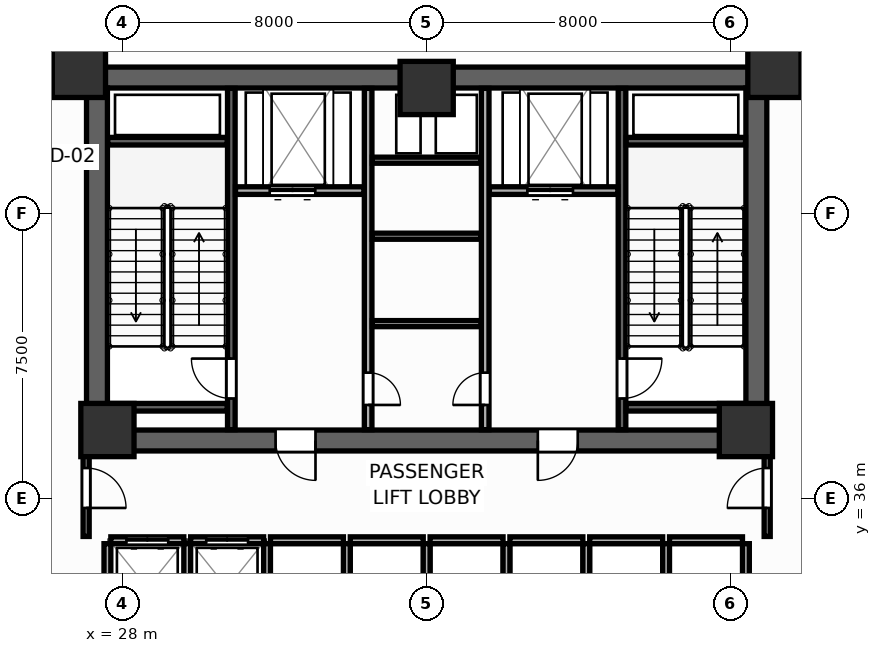
"""IFC4 building model, lengths in metres.
Left out: names, types, materials, properties, quantities, classifications, styles, units other than length and angle.
Written with IfcOpenShell. Run it as: python <this file> out.ifc"""

import sys

from ifc_helpers import new_model, si_unit, direction, frame, frame_2d, origin, origin_2d, place, context, subcontext, project, spatial, rectangle, extrude, source, transform, mapped, element, fill, save


model = new_model("IFC4")
c1 = context("Model", 3, precision=1e-05, world=origin(), true_north=direction((0.0, 1.0)))
c2 = subcontext(c1, "Body", "Model", "MODEL_VIEW")
j1 = project(units=[si_unit("LENGTHUNIT", "METRE"), si_unit("PLANEANGLEUNIT", "RADIAN")], contexts=[c1])
p1 = place(None, origin())
s1 = spatial("IfcSite", under=j1, at=p1, CompositionType="ELEMENT")
p2 = place(p1, origin())
s2 = spatial("IfcBuilding", under=s1, at=p2, CompositionType="ELEMENT")
p3 = place(p2, frame((0.0, 0.0, 19.2)))
s3 = spatial("IfcBuildingStorey", under=s2, at=p3, CompositionType="ELEMENT", Elevation=19.2)
p4 = place(p3, frame((27.05, 47.075, 0.0), z_axis=(0.0, 0.0, 1.0), x_axis=(1.0, 0.0, 0.0)))
e1 = element("IfcWall", 1, at=p4, inside=s3, PredefinedType="SHEAR", context=c2, shape_type="SweptSolid", body=[
    extrude(rectangle(XDim=17.9, YDim=0.55, at=frame_2d((8.95, 0.0))), origin(), (0.0, 0.0, 1.0), 4.8),
])
p5 = place(p3, frame((27.05, 37.525, 0.0), z_axis=(0.0, 0.0, 1.0), x_axis=(1.0, 0.0, 0.0)))
e2 = element("IfcWall", 2, at=p5, inside=s3, PredefinedType="SHEAR", context=c2, shape_type="SweptSolid", body=[
    extrude(rectangle(XDim=17.9, YDim=0.55, at=frame_2d((8.95, 0.0))), origin(), (0.0, 0.0, 1.0), 4.8),
])
p6 = place(p5, frame((4.975, 0.0, 0.0)))
e3 = element("IfcOpeningElement", 3, at=p6, cuts=e2, PredefinedType="OPENING", context=c2, shape_type="SweptSolid", body=[
    extrude(rectangle(XDim=1.05, YDim=2.1, at=frame_2d((0.525, 1.05))), frame((0.0, 0.285, 0.0), z_axis=(0.0, -1.0, 0.0), x_axis=(1.0, 0.0, 0.0)), (0.0, 0.0, 1.0), 0.57),
])
p7 = place(p5, frame((11.875, 0.0, 0.0)))
e4 = element("IfcOpeningElement", 4, at=p7, cuts=e2, PredefinedType="OPENING", context=c2, shape_type="SweptSolid", body=[
    extrude(rectangle(XDim=1.05, YDim=2.1, at=frame_2d((0.525, 1.05))), frame((0.0, 0.285, 0.0), z_axis=(0.0, -1.0, 0.0), x_axis=(1.0, 0.0, 0.0)), (0.0, 0.0, 1.0), 0.57),
])
for number, where, z_axis, x_axis in (
    (5, (27.325, 37.8, 0.0), (0.0, 0.0, 1.0), (0.0, 1.0, 0.0)),
    (6, (44.675, 37.8, 0.0), (0.0, 0.0, 1.0), (0.0, 1.0, 0.0)),
):
    element("IfcWall", number, at=place(p3, frame(where, z_axis=z_axis, x_axis=x_axis)), inside=s3, PredefinedType="SHEAR", context=c2, shape_type="SweptSolid", body=[
        extrude(rectangle(XDim=9.0, YDim=0.55, at=frame_2d((4.5, 0.0))), origin(), (0.0, 0.0, 1.0), 4.8),
    ])
m1 = source(origin(), c2, "Body", "SweptSolid", [
    extrude(rectangle(XDim=1.4, YDim=1.4, at=origin_2d()), origin(), (0.0, 0.0, 1.0), 4.8),
])
for number, where, z_axis, x_axis in (
    (7, (26.85, 47.25, 0.0), (0.0, 0.0, 1.0), (1.0, 0.0, 0.0)),
    (8, (45.15, 47.25, 0.0), (0.0, 0.0, 1.0), (1.0, 0.0, 0.0)),
    (9, (27.6, 37.8, 0.0), (0.0, 0.0, 1.0), (1.0, 0.0, 0.0)),
    (10, (44.4, 37.8, 0.0), (0.0, 0.0, 1.0), (1.0, 0.0, 0.0)),
    (11, (36.0, 46.8, 0.0), (0.0, 0.0, 1.0), (1.0, 0.0, 0.0)),
):
    element("IfcColumn", number, at=place(p3, frame(where, z_axis=z_axis, x_axis=x_axis)), inside=s3, PredefinedType="COLUMN", context=c2, shape_type="MappedRepresentation", body=[
        mapped(m1, transform((0.0, 0.0, 0.0), scale=1.0)),
    ])
p8 = place(p3, frame((30.86, 37.81, 0.0), z_axis=(0.0, 0.0, 1.0), x_axis=(0.0, 1.0, 0.0)))
e12 = element("IfcWall", 12, at=p8, inside=s3, PredefinedType="SHEAR", context=c2, shape_type="SweptSolid", body=[
    extrude(rectangle(XDim=8.98, YDim=0.2, at=frame_2d((4.49, 0.0))), origin(), (0.0, 0.0, 1.0), 4.8),
])
p9 = place(p8, frame((0.82, 0.0, 0.0)))
e13 = element("IfcOpeningElement", 13, at=p9, cuts=e12, PredefinedType="OPENING", context=c2, shape_type="SweptSolid", body=[
    extrude(rectangle(XDim=1.05, YDim=2.1, at=frame_2d((0.525, 1.05))), frame((0.0, 0.11, 0.0), z_axis=(0.0, -1.0, 0.0), x_axis=(1.0, 0.0, 0.0)), (0.0, 0.0, 1.0), 0.22),
])
for number, where, z_axis, x_axis in (
    (14, (27.61, 45.4, 0.0), (0.0, 0.0, 1.0), (1.0, 0.0, 0.0)),
    (15, (27.61, 38.4, 0.0), (0.0, 0.0, 1.0), (1.0, 0.0, 0.0)),
):
    element("IfcWall", number, at=place(p3, frame(where, z_axis=z_axis, x_axis=x_axis)), inside=s3, PredefinedType="SHEAR", context=c2, shape_type="SweptSolid", body=[
        extrude(rectangle(XDim=3.14, YDim=0.2, at=frame_2d((1.57, 0.0))), origin(), (0.0, 0.0, 1.0), 4.8),
    ])
p10 = place(p3, frame((41.14, 37.81, 0.0), z_axis=(0.0, 0.0, 1.0), x_axis=(0.0, 1.0, 0.0)))
e16 = element("IfcWall", 16, at=p10, inside=s3, PredefinedType="SHEAR", context=c2, shape_type="SweptSolid", body=[
    extrude(rectangle(XDim=8.98, YDim=0.2, at=frame_2d((4.49, 0.0))), origin(), (0.0, 0.0, 1.0), 4.8),
])
p11 = place(p10, frame((0.82, 0.0, 0.0)))
e17 = element("IfcOpeningElement", 17, at=p11, cuts=e16, PredefinedType="OPENING", context=c2, shape_type="SweptSolid", body=[
    extrude(rectangle(XDim=1.05, YDim=2.1, at=frame_2d((0.525, 1.05))), frame((0.0, 0.11, 0.0), z_axis=(0.0, -1.0, 0.0), x_axis=(1.0, 0.0, 0.0)), (0.0, 0.0, 1.0), 0.22),
])
for number, where, z_axis, x_axis in (
    (18, (41.25, 45.4, 0.0), (0.0, 0.0, 1.0), (1.0, 0.0, 0.0)),
    (19, (41.25, 38.4, 0.0), (0.0, 0.0, 1.0), (1.0, 0.0, 0.0)),
):
    element("IfcWall", number, at=place(p3, frame(where, z_axis=z_axis, x_axis=x_axis)), inside=s3, PredefinedType="SHEAR", context=c2, shape_type="SweptSolid", body=[
        extrude(rectangle(XDim=3.14, YDim=0.2, at=frame_2d((1.57, 0.0))), origin(), (0.0, 0.0, 1.0), 4.8),
    ])
p12 = place(p3, frame((30.97, 44.1, 0.0), z_axis=(0.0, 0.0, 1.0), x_axis=(1.0, 0.0, 0.0)))
e20 = element("IfcWall", 20, at=p12, inside=s3, PredefinedType="PARTITIONING", context=c2, shape_type="SweptSolid", body=[
    extrude(rectangle(XDim=3.38, YDim=0.2, at=frame_2d((1.69, 0.0))), origin(), (0.0, 0.0, 1.0), 4.58),
])
p13 = place(p12, frame((0.9, 0.0, 0.0)))
e21 = element("IfcOpeningElement", 21, at=p13, cuts=e20, PredefinedType="OPENING", context=c2, shape_type="SweptSolid", body=[
    extrude(rectangle(XDim=1.2, YDim=2.1, at=frame_2d((0.6, 1.05))), frame((0.0, 0.11, 0.0), z_axis=(0.0, -1.0, 0.0), x_axis=(1.0, 0.0, 0.0)), (0.0, 0.0, 1.0), 0.22),
])
p14 = place(p3, frame((37.65, 44.1, 0.0), z_axis=(0.0, 0.0, 1.0), x_axis=(1.0, 0.0, 0.0)))
e22 = element("IfcWall", 22, at=p14, inside=s3, PredefinedType="PARTITIONING", context=c2, shape_type="SweptSolid", body=[
    extrude(rectangle(XDim=3.38, YDim=0.2, at=frame_2d((1.69, 0.0))), origin(), (0.0, 0.0, 1.0), 4.58),
])
p15 = place(p14, frame((1.0, 0.0, 0.0)))
e23 = element("IfcOpeningElement", 23, at=p15, cuts=e22, PredefinedType="OPENING", context=c2, shape_type="SweptSolid", body=[
    extrude(rectangle(XDim=1.2, YDim=2.1, at=frame_2d((0.6, 1.05))), frame((0.0, 0.11, 0.0), z_axis=(0.0, -1.0, 0.0), x_axis=(1.0, 0.0, 0.0)), (0.0, 0.0, 1.0), 0.22),
])
p16 = place(p3, frame((34.46, 37.81, 0.0), z_axis=(0.0, 0.0, 1.0), x_axis=(0.0, 1.0, 0.0)))
e24 = element("IfcWall", 24, at=p16, inside=s3, PredefinedType="PARTITIONING", context=c2, shape_type="SweptSolid", body=[
    extrude(rectangle(XDim=8.98, YDim=0.2, at=frame_2d((4.49, 0.0))), origin(), (0.0, 0.0, 1.0), 4.58),
])
p17 = place(p16, frame((0.65, 0.0, 0.0)))
e25 = element("IfcOpeningElement", 25, at=p17, cuts=e24, PredefinedType="OPENING", context=c2, shape_type="SweptSolid", body=[
    extrude(rectangle(XDim=0.85, YDim=2.05, at=frame_2d((0.425, 1.025))), frame((0.0, 0.11, 0.0), z_axis=(0.0, -1.0, 0.0), x_axis=(1.0, 0.0, 0.0)), (0.0, 0.0, 1.0), 0.22),
])
p18 = place(p3, frame((37.54, 37.81, 0.0), z_axis=(0.0, 0.0, 1.0), x_axis=(0.0, 1.0, 0.0)))
e26 = element("IfcWall", 26, at=p18, inside=s3, PredefinedType="PARTITIONING", context=c2, shape_type="SweptSolid", body=[
    extrude(rectangle(XDim=8.98, YDim=0.2, at=frame_2d((4.49, 0.0))), origin(), (0.0, 0.0, 1.0), 4.58),
])
p19 = place(p18, frame((0.65, 0.0, 0.0)))
e27 = element("IfcOpeningElement", 27, at=p19, cuts=e26, PredefinedType="OPENING", context=c2, shape_type="SweptSolid", body=[
    extrude(rectangle(XDim=0.85, YDim=2.05, at=frame_2d((0.425, 1.025))), frame((0.0, 0.11, 0.0), z_axis=(0.0, -1.0, 0.0), x_axis=(1.0, 0.0, 0.0)), (0.0, 0.0, 1.0), 0.22),
])
for number, where, z_axis, x_axis in (
    (28, (34.57, 40.6, 0.0), (0.0, 0.0, 1.0), (1.0, 0.0, 0.0)),
    (29, (34.57, 42.9, 0.0), (0.0, 0.0, 1.0), (1.0, 0.0, 0.0)),
    (30, (34.57, 44.9, 0.0), (0.0, 0.0, 1.0), (1.0, 0.0, 0.0)),
):
    element("IfcWall", number, at=place(p3, frame(where, z_axis=z_axis, x_axis=x_axis)), inside=s3, PredefinedType="PARTITIONING", context=c2, shape_type="SweptSolid", body=[
        extrude(rectangle(XDim=2.86, YDim=0.16, at=frame_2d((1.43, 0.0))), origin(), (0.0, 0.0, 1.0), 4.58),
    ])
p20 = place(p3, frame((27.69, 34.9, 0.0), z_axis=(0.0, 0.0, 1.0), x_axis=(1.0, 0.0, 0.0)))
e31 = element("IfcWall", 31, at=p20, inside=s3, PredefinedType="PARTITIONING", context=c2, shape_type="SweptSolid", body=[
    extrude(rectangle(XDim=1.92, YDim=0.18, at=frame_2d((0.96, 0.0))), origin(), (0.0, 0.0, 1.0), 4.58),
])
p21 = place(p20, frame((0.41, 0.0, 0.0)))
e32 = element("IfcOpeningElement", 32, at=p21, cuts=e31, PredefinedType="OPENING", context=c2, shape_type="SweptSolid", body=[
    extrude(rectangle(XDim=1.1, YDim=2.1, at=frame_2d((0.55, 1.05))), frame((0.0, 0.1, 0.0), z_axis=(0.0, -1.0, 0.0), x_axis=(1.0, 0.0, 0.0)), (0.0, 0.0, 1.0), 0.2),
])
p22 = place(p3, frame((27.6, 32.49, 0.0), z_axis=(0.0, 0.0, 1.0), x_axis=(0.0, 1.0, 0.0)))
e33 = element("IfcWall", 33, at=p22, inside=s3, PredefinedType="PARTITIONING", context=c2, shape_type="SweptSolid", body=[
    extrude(rectangle(XDim=2.32, YDim=0.18, at=frame_2d((1.16, 0.0))), origin(), (0.0, 0.0, 1.0), 4.58),
])
p23 = place(p3, frame((29.79, 34.9, 0.0), z_axis=(0.0, 0.0, 1.0), x_axis=(1.0, 0.0, 0.0)))
e34 = element("IfcWall", 34, at=p23, inside=s3, PredefinedType="PARTITIONING", context=c2, shape_type="SweptSolid", body=[
    extrude(rectangle(XDim=1.92, YDim=0.18, at=frame_2d((0.96, 0.0))), origin(), (0.0, 0.0, 1.0), 4.58),
])
p24 = place(p23, frame((0.41, 0.0, 0.0)))
e35 = element("IfcOpeningElement", 35, at=p24, cuts=e34, PredefinedType="OPENING", context=c2, shape_type="SweptSolid", body=[
    extrude(rectangle(XDim=1.1, YDim=2.1, at=frame_2d((0.55, 1.05))), frame((0.0, 0.1, 0.0), z_axis=(0.0, -1.0, 0.0), x_axis=(1.0, 0.0, 0.0)), (0.0, 0.0, 1.0), 0.2),
])
p25 = place(p3, frame((29.7, 32.49, 0.0), z_axis=(0.0, 0.0, 1.0), x_axis=(0.0, 1.0, 0.0)))
e36 = element("IfcWall", 36, at=p25, inside=s3, PredefinedType="PARTITIONING", context=c2, shape_type="SweptSolid", body=[
    extrude(rectangle(XDim=2.32, YDim=0.18, at=frame_2d((1.16, 0.0))), origin(), (0.0, 0.0, 1.0), 4.58),
])
p26 = place(p3, frame((31.89, 34.9, 0.0), z_axis=(0.0, 0.0, 1.0), x_axis=(1.0, 0.0, 0.0)))
e37 = element("IfcWall", 37, at=p26, inside=s3, PredefinedType="PARTITIONING", context=c2, shape_type="SweptSolid", body=[
    extrude(rectangle(XDim=1.92, YDim=0.18, at=frame_2d((0.96, 0.0))), origin(), (0.0, 0.0, 1.0), 4.58),
])
p27 = place(p3, frame((31.8, 32.49, 0.0), z_axis=(0.0, 0.0, 1.0), x_axis=(0.0, 1.0, 0.0)))
e38 = element("IfcWall", 38, at=p27, inside=s3, PredefinedType="PARTITIONING", context=c2, shape_type="SweptSolid", body=[
    extrude(rectangle(XDim=2.32, YDim=0.18, at=frame_2d((1.16, 0.0))), origin(), (0.0, 0.0, 1.0), 4.58),
])
p28 = place(p3, frame((33.99, 34.9, 0.0), z_axis=(0.0, 0.0, 1.0), x_axis=(1.0, 0.0, 0.0)))
e39 = element("IfcWall", 39, at=p28, inside=s3, PredefinedType="PARTITIONING", context=c2, shape_type="SweptSolid", body=[
    extrude(rectangle(XDim=1.92, YDim=0.18, at=frame_2d((0.96, 0.0))), origin(), (0.0, 0.0, 1.0), 4.58),
])
p29 = place(p3, frame((33.9, 32.49, 0.0), z_axis=(0.0, 0.0, 1.0), x_axis=(0.0, 1.0, 0.0)))
e40 = element("IfcWall", 40, at=p29, inside=s3, PredefinedType="PARTITIONING", context=c2, shape_type="SweptSolid", body=[
    extrude(rectangle(XDim=2.32, YDim=0.18, at=frame_2d((1.16, 0.0))), origin(), (0.0, 0.0, 1.0), 4.58),
])
p30 = place(p3, frame((36.09, 34.9, 0.0), z_axis=(0.0, 0.0, 1.0), x_axis=(1.0, 0.0, 0.0)))
e41 = element("IfcWall", 41, at=p30, inside=s3, PredefinedType="PARTITIONING", context=c2, shape_type="SweptSolid", body=[
    extrude(rectangle(XDim=1.92, YDim=0.18, at=frame_2d((0.96, 0.0))), origin(), (0.0, 0.0, 1.0), 4.58),
])
p31 = place(p3, frame((36.0, 32.49, 0.0), z_axis=(0.0, 0.0, 1.0), x_axis=(0.0, 1.0, 0.0)))
e42 = element("IfcWall", 42, at=p31, inside=s3, PredefinedType="PARTITIONING", context=c2, shape_type="SweptSolid", body=[
    extrude(rectangle(XDim=2.32, YDim=0.18, at=frame_2d((1.16, 0.0))), origin(), (0.0, 0.0, 1.0), 4.58),
])
p32 = place(p3, frame((38.19, 34.9, 0.0), z_axis=(0.0, 0.0, 1.0), x_axis=(1.0, 0.0, 0.0)))
e43 = element("IfcWall", 43, at=p32, inside=s3, PredefinedType="PARTITIONING", context=c2, shape_type="SweptSolid", body=[
    extrude(rectangle(XDim=1.92, YDim=0.18, at=frame_2d((0.96, 0.0))), origin(), (0.0, 0.0, 1.0), 4.58),
])
p33 = place(p3, frame((38.1, 32.49, 0.0), z_axis=(0.0, 0.0, 1.0), x_axis=(0.0, 1.0, 0.0)))
e44 = element("IfcWall", 44, at=p33, inside=s3, PredefinedType="PARTITIONING", context=c2, shape_type="SweptSolid", body=[
    extrude(rectangle(XDim=2.32, YDim=0.18, at=frame_2d((1.16, 0.0))), origin(), (0.0, 0.0, 1.0), 4.58),
])
p34 = place(p3, frame((40.29, 34.9, 0.0), z_axis=(0.0, 0.0, 1.0), x_axis=(1.0, 0.0, 0.0)))
e45 = element("IfcWall", 45, at=p34, inside=s3, PredefinedType="PARTITIONING", context=c2, shape_type="SweptSolid", body=[
    extrude(rectangle(XDim=1.92, YDim=0.18, at=frame_2d((0.96, 0.0))), origin(), (0.0, 0.0, 1.0), 4.58),
])
p35 = place(p3, frame((40.2, 32.49, 0.0), z_axis=(0.0, 0.0, 1.0), x_axis=(0.0, 1.0, 0.0)))
e46 = element("IfcWall", 46, at=p35, inside=s3, PredefinedType="PARTITIONING", context=c2, shape_type="SweptSolid", body=[
    extrude(rectangle(XDim=2.32, YDim=0.18, at=frame_2d((1.16, 0.0))), origin(), (0.0, 0.0, 1.0), 4.58),
])
p36 = place(p3, frame((42.39, 34.9, 0.0), z_axis=(0.0, 0.0, 1.0), x_axis=(1.0, 0.0, 0.0)))
e47 = element("IfcWall", 47, at=p36, inside=s3, PredefinedType="PARTITIONING", context=c2, shape_type="SweptSolid", body=[
    extrude(rectangle(XDim=1.92, YDim=0.18, at=frame_2d((0.96, 0.0))), origin(), (0.0, 0.0, 1.0), 4.58),
])
for number, where, z_axis, x_axis in (
    (48, (42.3, 32.49, 0.0), (0.0, 0.0, 1.0), (0.0, 1.0, 0.0)),
    (49, (44.4, 32.49, 0.0), (0.0, 0.0, 1.0), (0.0, 1.0, 0.0)),
):
    element("IfcWall", number, at=place(p3, frame(where, z_axis=z_axis, x_axis=x_axis)), inside=s3, PredefinedType="PARTITIONING", context=c2, shape_type="SweptSolid", body=[
        extrude(rectangle(XDim=2.32, YDim=0.18, at=frame_2d((1.16, 0.0))), origin(), (0.0, 0.0, 1.0), 4.58),
    ])
p37 = place(p3, frame((27.04, 35.0, 0.0), z_axis=(0.0, 0.0, 1.0), x_axis=(0.0, 1.0, 0.0)))
e50 = element("IfcWall", 50, at=p37, inside=s3, PredefinedType="PARTITIONING", context=c2, shape_type="SweptSolid", body=[
    extrude(rectangle(XDim=2.65, YDim=0.16, at=frame_2d((1.325, 0.0))), origin(), (0.0, 0.0, 1.0), 4.58),
])
p38 = place(p37, frame((0.75, 0.0, 0.0)))
e51 = element("IfcOpeningElement", 51, at=p38, cuts=e50, PredefinedType="OPENING", context=c2, shape_type="SweptSolid", body=[
    extrude(rectangle(XDim=1.05, YDim=2.1, at=frame_2d((0.525, 1.05))), frame((0.0, 0.09, 0.0), z_axis=(0.0, -1.0, 0.0), x_axis=(1.0, 0.0, 0.0)), (0.0, 0.0, 1.0), 0.18),
])
p39 = place(p3, frame((44.96, 35.0, 0.0), z_axis=(0.0, 0.0, 1.0), x_axis=(0.0, 1.0, 0.0)))
e52 = element("IfcWall", 52, at=p39, inside=s3, PredefinedType="PARTITIONING", context=c2, shape_type="SweptSolid", body=[
    extrude(rectangle(XDim=2.65, YDim=0.16, at=frame_2d((1.325, 0.0))), origin(), (0.0, 0.0, 1.0), 4.58),
])
p40 = place(p39, frame((0.75, 0.0, 0.0)))
e53 = element("IfcOpeningElement", 53, at=p40, cuts=e52, PredefinedType="OPENING", context=c2, shape_type="SweptSolid", body=[
    extrude(rectangle(XDim=1.05, YDim=2.1, at=frame_2d((0.525, 1.05))), frame((0.0, 0.09, 0.0), z_axis=(0.0, -1.0, 0.0), x_axis=(1.0, 0.0, 0.0)), (0.0, 0.0, 1.0), 0.18),
])
p41 = place(p3, frame((27.035, 47.34, 0.0), z_axis=(0.0, 0.0, 1.0), x_axis=(0.0, 1.0, 0.0)))
e54 = element("IfcWall", 54, at=p41, inside=s3, PredefinedType="PARTITIONING", context=c2, shape_type="SweptSolid", body=[
    extrude(rectangle(XDim=11.64, YDim=0.16, at=frame_2d((5.82, 0.0))), origin(), (0.0, 0.0, 1.0), 4.58),
])
p42 = place(p41, frame((5.238, 0.0, 0.0)))
e55 = element("IfcOpeningElement", 55, at=p42, cuts=e54, PredefinedType="OPENING", context=c2, shape_type="SweptSolid", body=[
    extrude(rectangle(XDim=0.95, YDim=2.05, at=frame_2d((0.475, 1.025))), frame((0.0, 0.09, 0.0), z_axis=(0.0, -1.0, 0.0), x_axis=(1.0, 0.0, 0.0)), (0.0, 0.0, 1.0), 0.18),
])
p43 = place(p3, frame((44.965, 47.34, 0.0), z_axis=(0.0, 0.0, 1.0), x_axis=(0.0, 1.0, 0.0)))
e56 = element("IfcWall", 56, at=p43, inside=s3, PredefinedType="PARTITIONING", context=c2, shape_type="SweptSolid", body=[
    extrude(rectangle(XDim=11.64, YDim=0.16, at=frame_2d((5.82, 0.0))), origin(), (0.0, 0.0, 1.0), 4.58),
])
p44 = place(p9, origin())
e57 = element("IfcDoor", 57, at=p44, inside=s3, OperationType="SINGLE_SWING_RIGHT", PredefinedType="DOOR", context=c2, shape_type="SweptSolid", body=[
    extrude(rectangle(XDim=1.05, YDim=2.1, at=frame_2d((0.525, 1.05))), frame((0.0, 0.025, 0.0), z_axis=(0.0, -1.0, 0.0), x_axis=(1.0, 0.0, 0.0)), (0.0, 0.0, 1.0), 0.05),
])
fill(e13, e57)
p45 = place(p11, frame((1.05, 0.0, 0.0), z_axis=(0.0, 0.0, 1.0), x_axis=(-1.0, 0.0, 0.0)))
e58 = element("IfcDoor", 58, at=p45, inside=s3, OperationType="SINGLE_SWING_LEFT", PredefinedType="DOOR", context=c2, shape_type="SweptSolid", body=[
    extrude(rectangle(XDim=1.05, YDim=2.1, at=frame_2d((0.525, 1.05))), frame((0.0, 0.025, 0.0), z_axis=(0.0, -1.0, 0.0), x_axis=(1.0, 0.0, 0.0)), (0.0, 0.0, 1.0), 0.05),
])
fill(e17, e58)
p46 = place(p13, origin())
e59 = element("IfcDoor", 59, at=p46, inside=s3, OperationType="DOUBLE_DOOR_SLIDING", PredefinedType="DOOR", context=c2, shape_type="SweptSolid", body=[
    extrude(rectangle(XDim=1.2, YDim=2.1, at=frame_2d((0.6, 1.05))), frame((0.0, 0.025, 0.0), z_axis=(0.0, -1.0, 0.0), x_axis=(1.0, 0.0, 0.0)), (0.0, 0.0, 1.0), 0.05),
])
fill(e21, e59)
p47 = place(p15, origin())
e60 = element("IfcDoor", 60, at=p47, inside=s3, OperationType="DOUBLE_DOOR_SLIDING", PredefinedType="DOOR", context=c2, shape_type="SweptSolid", body=[
    extrude(rectangle(XDim=1.2, YDim=2.1, at=frame_2d((0.6, 1.05))), frame((0.0, 0.025, 0.0), z_axis=(0.0, -1.0, 0.0), x_axis=(1.0, 0.0, 0.0)), (0.0, 0.0, 1.0), 0.05),
])
fill(e23, e60)
p48 = place(p17, frame((0.85, 0.0, 0.0), z_axis=(0.0, 0.0, 1.0), x_axis=(-1.0, 0.0, 0.0)))
e61 = element("IfcDoor", 61, at=p48, inside=s3, OperationType="SINGLE_SWING_RIGHT", PredefinedType="DOOR", context=c2, shape_type="SweptSolid", body=[
    extrude(rectangle(XDim=0.85, YDim=2.05, at=frame_2d((0.425, 1.025))), frame((0.0, 0.025, 0.0), z_axis=(0.0, -1.0, 0.0), x_axis=(1.0, 0.0, 0.0)), (0.0, 0.0, 1.0), 0.05),
])
fill(e25, e61)
p49 = place(p19, origin())
e62 = element("IfcDoor", 62, at=p49, inside=s3, OperationType="SINGLE_SWING_LEFT", PredefinedType="DOOR", context=c2, shape_type="SweptSolid", body=[
    extrude(rectangle(XDim=0.85, YDim=2.05, at=frame_2d((0.425, 1.025))), frame((0.0, 0.025, 0.0), z_axis=(0.0, -1.0, 0.0), x_axis=(1.0, 0.0, 0.0)), (0.0, 0.0, 1.0), 0.05),
])
fill(e27, e62)
p50 = place(p21, origin())
e63 = element("IfcDoor", 63, at=p50, inside=s3, OperationType="DOUBLE_DOOR_SLIDING", PredefinedType="DOOR", context=c2, shape_type="SweptSolid", body=[
    extrude(rectangle(XDim=1.1, YDim=2.1, at=frame_2d((0.55, 1.05))), frame((0.0, 0.025, 0.0), z_axis=(0.0, -1.0, 0.0), x_axis=(1.0, 0.0, 0.0)), (0.0, 0.0, 1.0), 0.05),
])
fill(e32, e63)
p51 = place(p24, origin())
e64 = element("IfcDoor", 64, at=p51, inside=s3, OperationType="DOUBLE_DOOR_SLIDING", PredefinedType="DOOR", context=c2, shape_type="SweptSolid", body=[
    extrude(rectangle(XDim=1.1, YDim=2.1, at=frame_2d((0.55, 1.05))), frame((0.0, 0.025, 0.0), z_axis=(0.0, -1.0, 0.0), x_axis=(1.0, 0.0, 0.0)), (0.0, 0.0, 1.0), 0.05),
])
fill(e35, e64)
p52 = place(p38, frame((1.05, 0.0, 0.0), z_axis=(0.0, 0.0, 1.0), x_axis=(-1.0, 0.0, 0.0)))
e65 = element("IfcDoor", 65, at=p52, inside=s3, OperationType="SINGLE_SWING_RIGHT", PredefinedType="DOOR", context=c2, shape_type="SweptSolid", body=[
    extrude(rectangle(XDim=1.05, YDim=2.1, at=frame_2d((0.525, 1.05))), frame((0.0, 0.025, 0.0), z_axis=(0.0, -1.0, 0.0), x_axis=(1.0, 0.0, 0.0)), (0.0, 0.0, 1.0), 0.05),
])
fill(e51, e65)
p53 = place(p40, origin())
e66 = element("IfcDoor", 66, at=p53, inside=s3, OperationType="SINGLE_SWING_LEFT", PredefinedType="DOOR", context=c2, shape_type="SweptSolid", body=[
    extrude(rectangle(XDim=1.05, YDim=2.1, at=frame_2d((0.525, 1.05))), frame((0.0, 0.025, 0.0), z_axis=(0.0, -1.0, 0.0), x_axis=(1.0, 0.0, 0.0)), (0.0, 0.0, 1.0), 0.05),
])
fill(e53, e66)
p54 = place(p6, frame((1.05, 0.0, 0.0), z_axis=(0.0, 0.0, 1.0), x_axis=(-1.0, 0.0, 0.0)))
e67 = element("IfcDoor", 67, at=p54, inside=s3, OperationType="SINGLE_SWING_LEFT", PredefinedType="DOOR", context=c2, shape_type="SweptSolid", body=[
    extrude(rectangle(XDim=1.05, YDim=2.1, at=frame_2d((0.525, 1.05))), frame((0.0, 0.025, 0.0), z_axis=(0.0, -1.0, 0.0), x_axis=(1.0, 0.0, 0.0)), (0.0, 0.0, 1.0), 0.05),
])
fill(e3, e67)
p55 = place(p7, frame((1.05, 0.0, 0.0), z_axis=(0.0, 0.0, 1.0), x_axis=(-1.0, 0.0, 0.0)))
e68 = element("IfcDoor", 68, at=p55, inside=s3, OperationType="SINGLE_SWING_RIGHT", PredefinedType="DOOR", context=c2, shape_type="SweptSolid", body=[
    extrude(rectangle(XDim=1.05, YDim=2.1, at=frame_2d((0.525, 1.05))), frame((0.0, 0.025, 0.0), z_axis=(0.0, -1.0, 0.0), x_axis=(1.0, 0.0, 0.0)), (0.0, 0.0, 1.0), 0.05),
])
fill(e4, e68)
save(model, sys.argv[1])
